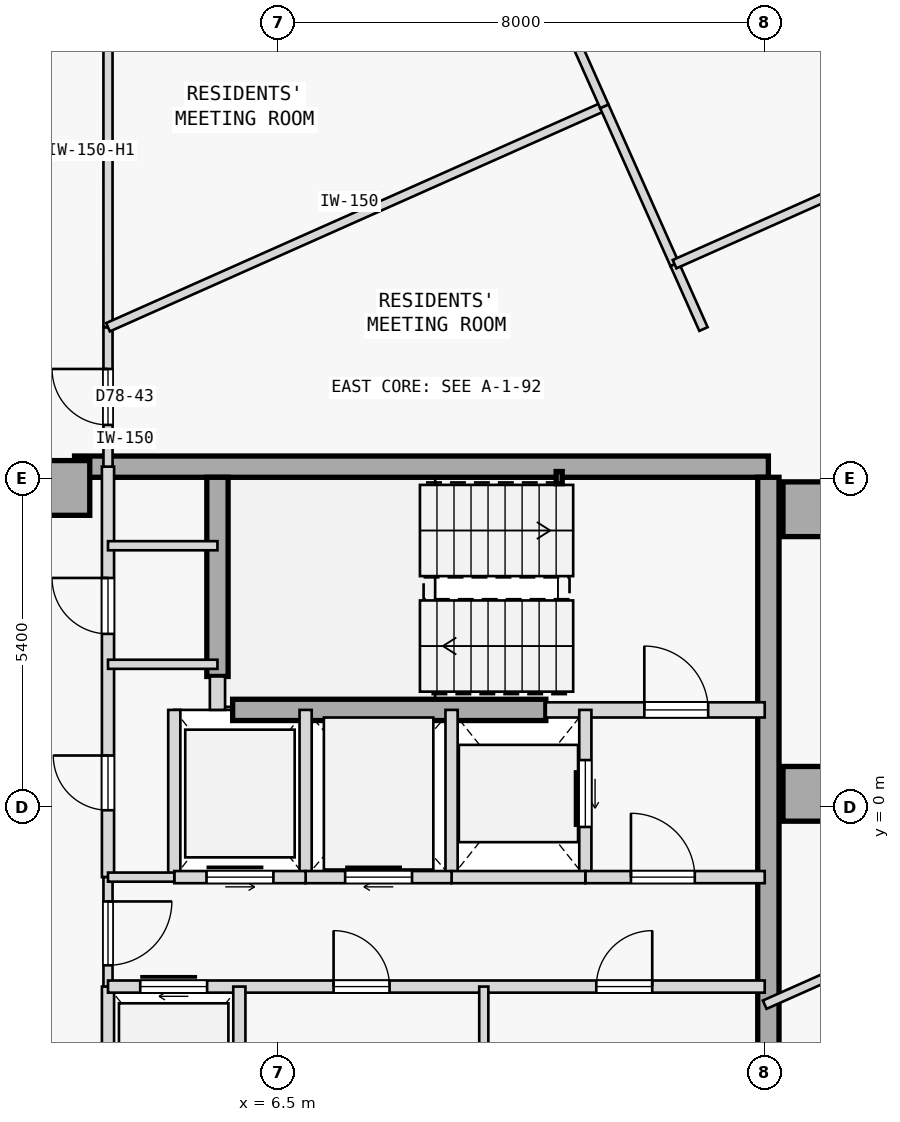
"""IFC4 building model, lengths in metres.
Left out: names, types, materials, properties, quantities, classifications, styles, units other than length and angle.
Written with IfcOpenShell. Run it as: python <this file> out.ifc"""

import sys

from ifc_helpers import new_model, si_unit, direction, frame, frame_2d, origin, origin_2d, place, context, subcontext, project, spatial, rectangle, hollow_rectangle, extrude, element, fill, save


model = new_model("IFC4")
c1 = context("Model", 3, precision=1e-05, world=origin(), true_north=direction((0.0, 1.0)))
c2 = subcontext(c1, "Body", "Model", "MODEL_VIEW")
j1 = project(units=[si_unit("LENGTHUNIT", "METRE"), si_unit("PLANEANGLEUNIT", "RADIAN")], contexts=[c1])
p1 = place(None, origin())
s1 = spatial("IfcSite", under=j1, at=p1, CompositionType="ELEMENT")
p2 = place(p1, origin())
s2 = spatial("IfcBuilding", under=s1, at=p2, CompositionType="ELEMENT")
p3 = place(p2, frame((0.0, 0.0, 291.95)))
s3 = spatial("IfcBuildingStorey", under=s2, at=p3, CompositionType="ELEMENT", Elevation=291.95)
for number, where, z_axis, x_axis in (
    (1, (15.25, 4.9, 0.0), (0.0, 0.0, 1.0), (1.0, 0.0, 0.0)),
    (2, (15.25, 0.22, 0.0), (0.0, 0.0, 1.0), (1.0, 0.0, 0.0)),
    (3, (2.95, 5.25, 0.0), (0.0, 0.0, 1.0), (1.0, 0.0, 0.0)),
):
    element("IfcColumn", number, at=place(p3, frame(where, z_axis=z_axis, x_axis=x_axis)), inside=s3, PredefinedType="COLUMN", context=c2, shape_type="SweptSolid", body=[
        extrude(rectangle(XDim=0.9, YDim=0.9, at=origin_2d()), origin(), (0.0, 0.0, 1.0), 3.35),
    ])
p4 = place(p3, frame((3.15, 5.6, 0.0), z_axis=(0.0, 0.0, 1.0), x_axis=(1.0, 0.0, 0.0)))
e4 = element("IfcWall", 4, at=p4, inside=s3, PredefinedType="SHEAR", context=c2, shape_type="SweptSolid", body=[
    extrude(rectangle(XDim=11.41, YDim=0.35, at=frame_2d((5.705, 0.0))), origin(), (0.0, 0.0, 1.0), 3.125),
])
p5 = place(p3, frame((14.56, -5.425, 0.0), z_axis=(0.0, 0.0, 1.0), x_axis=(0.0, 1.0, 0.0)))
e5 = element("IfcWall", 5, at=p5, inside=s3, PredefinedType="SHEAR", context=c2, shape_type="SweptSolid", body=[
    extrude(rectangle(XDim=10.85, YDim=0.35, at=frame_2d((5.425, 0.0))), origin(), (0.0, 0.0, 1.0), 3.125),
])
p6 = place(p3, frame((5.5, 2.15, 0.0), z_axis=(0.0, 0.0, 1.0), x_axis=(0.0, 1.0, 0.0)))
e6 = element("IfcWall", 6, at=p6, inside=s3, PredefinedType="SHEAR", context=c2, shape_type="SweptSolid", body=[
    extrude(rectangle(XDim=3.275, YDim=0.35, at=frame_2d((1.638, 0.0))), origin(), (0.0, 0.0, 1.0), 3.125),
])
p7 = place(p3, frame((5.75, 1.6, 0.0), z_axis=(0.0, 0.0, 1.0), x_axis=(1.0, 0.0, 0.0)))
e7 = element("IfcWall", 7, at=p7, inside=s3, PredefinedType="SHEAR", context=c2, shape_type="SweptSolid", body=[
    extrude(rectangle(XDim=5.15, YDim=0.35, at=frame_2d((2.575, 0.0))), origin(), (0.0, 0.0, 1.0), 3.125),
])
p8 = place(p3, frame((11.12, 5.42, 0.0), z_axis=(0.0, 0.0, 1.0), x_axis=(1.0, 0.0, 0.0)))
e8 = element("IfcColumn", 8, at=p8, inside=s3, PredefinedType="COLUMN", context=c2, shape_type="SweptSolid", body=[
    extrude(hollow_rectangle(XDim=0.1, YDim=0.2, WallThickness=0.008, at=origin_2d()), origin(), (0.0, 0.0, 1.0), 3.35),
])
p9 = place(p3, frame((10.9, 1.6, 0.0), z_axis=(0.0, 0.0, 1.0), x_axis=(1.0, 0.0, 0.0)))
e9 = element("IfcWall", 9, at=p9, inside=s3, PredefinedType="STANDARD", context=c2, shape_type="SweptSolid", body=[
    extrude(rectangle(XDim=3.6, YDim=0.25, at=frame_2d((1.8, 0.0))), origin(), (0.0, 0.0, 1.0), 3.125),
])
p10 = place(p9, frame((1.62, 0.0, 0.0)))
e10 = element("IfcOpeningElement", 10, at=p10, cuts=e9, PredefinedType="OPENING", context=c2, shape_type="SweptSolid", body=[
    extrude(rectangle(XDim=1.05, YDim=2.15, at=frame_2d((0.525, 1.075))), frame((0.0, 0.135, 0.0), z_axis=(0.0, -1.0, 0.0), x_axis=(1.0, 0.0, 0.0)), (0.0, 0.0, 1.0), 0.27),
])
p11 = place(p3, frame((5.5, 1.6, 0.0), z_axis=(0.0, 0.0, 1.0), x_axis=(0.0, 1.0, 0.0)))
e11 = element("IfcWall", 11, at=p11, inside=s3, PredefinedType="STANDARD", context=c2, shape_type="SweptSolid", body=[
    extrude(rectangle(XDim=0.55, YDim=0.25, at=frame_2d((0.275, 0.0))), origin(), (0.0, 0.0, 1.0), 3.125),
])
p12 = place(p3, frame((3.7, -1.15, 0.0), z_axis=(0.0, 0.0, 1.0), x_axis=(0.0, 1.0, 0.0)))
e12 = element("IfcWall", 12, at=p12, inside=s3, PredefinedType="STANDARD", context=c2, shape_type="SweptSolid", body=[
    extrude(rectangle(XDim=6.75, YDim=0.2, at=frame_2d((3.375, 0.0))), origin(), (0.0, 0.0, 1.0), 3.125),
])
p13 = place(p12, frame((1.1, 0.0, 0.0)))
e13 = element("IfcOpeningElement", 13, at=p13, cuts=e12, PredefinedType="OPENING", context=c2, shape_type="SweptSolid", body=[
    extrude(rectangle(XDim=0.9, YDim=2.15, at=frame_2d((0.45, 1.075))), frame((0.0, 0.11, 0.0), z_axis=(0.0, -1.0, 0.0), x_axis=(1.0, 0.0, 0.0)), (0.0, 0.0, 1.0), 0.22),
])
p14 = place(p12, frame((4.0, 0.0, 0.0)))
e14 = element("IfcOpeningElement", 14, at=p14, cuts=e12, PredefinedType="OPENING", context=c2, shape_type="SweptSolid", body=[
    extrude(rectangle(XDim=0.92, YDim=2.15, at=frame_2d((0.46, 1.075))), frame((0.0, 0.11, 0.0), z_axis=(0.0, -1.0, 0.0), x_axis=(1.0, 0.0, 0.0)), (0.0, 0.0, 1.0), 0.22),
])
p15 = place(p3, frame((3.7, -2.95, 0.0), z_axis=(0.0, 0.0, 1.0), x_axis=(0.0, 1.0, 0.0)))
e15 = element("IfcWall", 15, at=p15, inside=s3, PredefinedType="PARTITIONING", context=c2, shape_type="SweptSolid", body=[
    extrude(rectangle(XDim=1.8, YDim=0.15, at=frame_2d((0.9, 0.0))), origin(), (0.0, 0.0, 1.0), 3.125),
])
p16 = place(p15, frame((0.35, 0.0, 0.0)))
e16 = element("IfcOpeningElement", 16, at=p16, cuts=e15, PredefinedType="OPENING", context=c2, shape_type="SweptSolid", body=[
    extrude(rectangle(XDim=1.05, YDim=2.18, at=frame_2d((0.525, 1.09))), frame((0.0, 0.085, 0.0), z_axis=(0.0, -1.0, 0.0), x_axis=(1.0, 0.0, 0.0)), (0.0, 0.0, 1.0), 0.17),
])
p17 = place(p3, frame((3.7, -5.6, 0.0), z_axis=(0.0, 0.0, 1.0), x_axis=(0.0, 1.0, 0.0)))
e17 = element("IfcWall", 17, at=p17, inside=s3, PredefinedType="STANDARD", context=c2, shape_type="SweptSolid", body=[
    extrude(rectangle(XDim=2.65, YDim=0.2, at=frame_2d((1.325, 0.0))), origin(), (0.0, 0.0, 1.0), 3.125),
])
p18 = place(p3, frame((11.55, -1.15, 0.0), z_axis=(0.0, 0.0, 1.0), x_axis=(0.0, 1.0, 0.0)))
e18 = element("IfcWall", 18, at=p18, inside=s3, PredefinedType="STANDARD", context=c2, shape_type="SweptSolid", body=[
    extrude(rectangle(XDim=2.75, YDim=0.2, at=frame_2d((1.375, 0.0))), origin(), (0.0, 0.0, 1.0), 3.125),
])
p19 = place(p18, frame((0.825, 0.0, 0.0)))
e19 = element("IfcOpeningElement", 19, at=p19, cuts=e18, PredefinedType="OPENING", context=c2, shape_type="SweptSolid", body=[
    extrude(rectangle(XDim=1.1, YDim=2.15, at=frame_2d((0.55, 1.075))), frame((0.0, 0.11, 0.0), z_axis=(0.0, -1.0, 0.0), x_axis=(1.0, 0.0, 0.0)), (0.0, 0.0, 1.0), 0.22),
])
p20 = place(p3, frame((9.35, -1.15, 0.0), z_axis=(0.0, 0.0, 1.0), x_axis=(0.0, 1.0, 0.0)))
e20 = element("IfcWall", 20, at=p20, inside=s3, PredefinedType="STANDARD", context=c2, shape_type="SweptSolid", body=[
    extrude(rectangle(XDim=2.75, YDim=0.2, at=frame_2d((1.375, 0.0))), origin(), (0.0, 0.0, 1.0), 3.125),
])
p21 = place(p3, frame((11.55, -1.15, 0.0), z_axis=(0.0, 0.0, 1.0), x_axis=(1.0, 0.0, 0.0)))
e21 = element("IfcWall", 21, at=p21, inside=s3, PredefinedType="STANDARD", context=c2, shape_type="SweptSolid", body=[
    extrude(rectangle(XDim=2.95, YDim=0.2, at=frame_2d((1.475, 0.0))), origin(), (0.0, 0.0, 1.0), 3.125),
])
p22 = place(p21, frame((0.75, 0.0, 0.0)))
e22 = element("IfcOpeningElement", 22, at=p22, cuts=e21, PredefinedType="OPENING", context=c2, shape_type="SweptSolid", body=[
    extrude(rectangle(XDim=1.05, YDim=2.18, at=frame_2d((0.525, 1.09))), frame((0.0, 0.11, 0.0), z_axis=(0.0, -1.0, 0.0), x_axis=(1.0, 0.0, 0.0)), (0.0, 0.0, 1.0), 0.22),
])
p23 = place(p3, frame((9.35, -1.15, 0.0), z_axis=(0.0, 0.0, 1.0), x_axis=(1.0, 0.0, 0.0)))
e23 = element("IfcWall", 23, at=p23, inside=s3, PredefinedType="STANDARD", context=c2, shape_type="SweptSolid", body=[
    extrude(rectangle(XDim=2.2, YDim=0.2, at=frame_2d((1.1, 0.0))), origin(), (0.0, 0.0, 1.0), 3.125),
])
p24 = place(p3, frame((6.95, -1.15, 0.0), z_axis=(0.0, 0.0, 1.0), x_axis=(0.0, 1.0, 0.0)))
e24 = element("IfcWall", 24, at=p24, inside=s3, PredefinedType="STANDARD", context=c2, shape_type="SweptSolid", body=[
    extrude(rectangle(XDim=2.75, YDim=0.2, at=frame_2d((1.375, 0.0))), origin(), (0.0, 0.0, 1.0), 3.125),
])
p25 = place(p3, frame((6.95, -1.15, 0.0), z_axis=(0.0, 0.0, 1.0), x_axis=(1.0, 0.0, 0.0)))
e25 = element("IfcWall", 25, at=p25, inside=s3, PredefinedType="STANDARD", context=c2, shape_type="SweptSolid", body=[
    extrude(rectangle(XDim=2.4, YDim=0.2, at=frame_2d((1.2, 0.0))), origin(), (0.0, 0.0, 1.0), 3.125),
])
p26 = place(p25, frame((0.65, 0.0, 0.0)))
e26 = element("IfcOpeningElement", 26, at=p26, cuts=e25, PredefinedType="OPENING", context=c2, shape_type="SweptSolid", body=[
    extrude(rectangle(XDim=1.1, YDim=2.15, at=frame_2d((0.55, 1.075))), frame((0.0, 0.11, 0.0), z_axis=(0.0, -1.0, 0.0), x_axis=(1.0, 0.0, 0.0)), (0.0, 0.0, 1.0), 0.22),
])
p27 = place(p3, frame((4.79, -1.15, 0.0), z_axis=(0.0, 0.0, 1.0), x_axis=(0.0, 1.0, 0.0)))
e27 = element("IfcWall", 27, at=p27, inside=s3, PredefinedType="STANDARD", context=c2, shape_type="SweptSolid", body=[
    extrude(rectangle(XDim=2.75, YDim=0.2, at=frame_2d((1.375, 0.0))), origin(), (0.0, 0.0, 1.0), 3.125),
])
p28 = place(p3, frame((4.79, -1.15, 0.0), z_axis=(0.0, 0.0, 1.0), x_axis=(1.0, 0.0, 0.0)))
e28 = element("IfcWall", 28, at=p28, inside=s3, PredefinedType="STANDARD", context=c2, shape_type="SweptSolid", body=[
    extrude(rectangle(XDim=2.16, YDim=0.2, at=frame_2d((1.08, 0.0))), origin(), (0.0, 0.0, 1.0), 3.125),
])
p29 = place(p28, frame((0.53, 0.0, 0.0)))
e29 = element("IfcOpeningElement", 29, at=p29, cuts=e28, PredefinedType="OPENING", context=c2, shape_type="SweptSolid", body=[
    extrude(rectangle(XDim=1.1, YDim=2.15, at=frame_2d((0.55, 1.075))), frame((0.0, 0.11, 0.0), z_axis=(0.0, -1.0, 0.0), x_axis=(1.0, 0.0, 0.0)), (0.0, 0.0, 1.0), 0.22),
])
p30 = place(p3, frame((3.7, -1.15, 0.0), z_axis=(0.0, 0.0, 1.0), x_axis=(1.0, 0.0, 0.0)))
e30 = element("IfcWall", 30, at=p30, inside=s3, PredefinedType="PARTITIONING", context=c2, shape_type="SweptSolid", body=[
    extrude(rectangle(XDim=1.09, YDim=0.15, at=frame_2d((0.545, 0.0))), origin(), (0.0, 0.0, 1.0), 3.125),
])
p31 = place(p3, frame((3.7, -2.95, 0.0), z_axis=(0.0, 0.0, 1.0), x_axis=(1.0, 0.0, 0.0)))
e31 = element("IfcWall", 31, at=p31, inside=s3, PredefinedType="STANDARD", context=c2, shape_type="SweptSolid", body=[
    extrude(rectangle(XDim=10.8, YDim=0.2, at=frame_2d((5.4, 0.0))), origin(), (0.0, 0.0, 1.0), 3.125),
])
p32 = place(p31, frame((0.53, 0.0, 0.0)))
e32 = element("IfcOpeningElement", 32, at=p32, cuts=e31, PredefinedType="OPENING", context=c2, shape_type="SweptSolid", body=[
    extrude(rectangle(XDim=1.1, YDim=2.15, at=frame_2d((0.55, 1.075))), frame((0.0, 0.11, 0.0), z_axis=(0.0, -1.0, 0.0), x_axis=(1.0, 0.0, 0.0)), (0.0, 0.0, 1.0), 0.22),
])
p33 = place(p31, frame((3.71, 0.0, 0.0)))
e33 = element("IfcOpeningElement", 33, at=p33, cuts=e31, PredefinedType="OPENING", context=c2, shape_type="SweptSolid", body=[
    extrude(rectangle(XDim=0.92, YDim=2.15, at=frame_2d((0.46, 1.075))), frame((0.0, 0.11, 0.0), z_axis=(0.0, -1.0, 0.0), x_axis=(1.0, 0.0, 0.0)), (0.0, 0.0, 1.0), 0.22),
])
p34 = place(p31, frame((8.03, 0.0, 0.0)))
e34 = element("IfcOpeningElement", 34, at=p34, cuts=e31, PredefinedType="OPENING", context=c2, shape_type="SweptSolid", body=[
    extrude(rectangle(XDim=0.92, YDim=2.15, at=frame_2d((0.46, 1.075))), frame((0.0, 0.11, 0.0), z_axis=(0.0, -1.0, 0.0), x_axis=(1.0, 0.0, 0.0)), (0.0, 0.0, 1.0), 0.22),
])
p35 = place(p3, frame((5.86, -5.6, 0.0), z_axis=(0.0, 0.0, 1.0), x_axis=(0.0, 1.0, 0.0)))
e35 = element("IfcWall", 35, at=p35, inside=s3, PredefinedType="STANDARD", context=c2, shape_type="SweptSolid", body=[
    extrude(rectangle(XDim=2.65, YDim=0.2, at=frame_2d((1.325, 0.0))), origin(), (0.0, 0.0, 1.0), 3.125),
])
p36 = place(p3, frame((9.88, -5.6, 0.0), z_axis=(0.0, 0.0, 1.0), x_axis=(0.0, 1.0, 0.0)))
e36 = element("IfcWall", 36, at=p36, inside=s3, PredefinedType="PARTITIONING", context=c2, shape_type="SweptSolid", body=[
    extrude(rectangle(XDim=2.65, YDim=0.15, at=frame_2d((1.325, 0.0))), origin(), (0.0, 0.0, 1.0), 3.125),
])
for number, where, z_axis, x_axis in (
    (37, (3.7, 4.3, 0.0), (0.0, 0.0, 1.0), (1.0, 0.0, 0.0)),
    (38, (3.7, 2.35, 0.0), (0.0, 0.0, 1.0), (1.0, 0.0, 0.0)),
):
    element("IfcWall", number, at=place(p3, frame(where, z_axis=z_axis, x_axis=x_axis)), inside=s3, PredefinedType="PARTITIONING", context=c2, shape_type="SweptSolid", body=[
        extrude(rectangle(XDim=1.8, YDim=0.15, at=frame_2d((0.9, 0.0))), origin(), (0.0, 0.0, 1.0), 3.125),
    ])
p37 = place(p3, frame((14.5, -5.6, 0.0), z_axis=(0.0, 0.0, 1.0), x_axis=(0.913550607208, 0.406725076766, 0.0)))
e39 = element("IfcWall", 39, at=p37, inside=s3, PredefinedType="PARTITIONING", context=c2, shape_type="SweptSolid", body=[
    extrude(rectangle(XDim=4.556, YDim=0.15, at=frame_2d((2.278, 0.0))), origin(), (0.0, 0.0, 1.0), 3.125),
])
p38 = place(p37, frame((2.501, 0.0, 0.0)))
e40 = element("IfcOpeningElement", 40, at=p38, cuts=e39, PredefinedType="OPENING", context=c2, shape_type="SweptSolid", body=[
    extrude(rectangle(XDim=0.92, YDim=2.15, at=frame_2d((0.46, 1.075))), frame((0.0, 0.085, 0.0), z_axis=(0.0, -1.0, 0.0), x_axis=(1.0, 0.0, 0.0)), (0.0, 0.0, 1.0), 0.17),
])
p39 = place(p3, frame((3.7, 5.601, 0.0), z_axis=(0.0, 0.0, 1.0), x_axis=(-0.00010651896, 0.999999994327, 0.0)))
e41 = element("IfcWall", 41, at=p39, inside=s3, PredefinedType="PARTITIONING", context=c2, shape_type="SweptSolid", body=[
    extrude(rectangle(XDim=2.292, YDim=0.15, at=frame_2d((1.146, 0.0))), origin(), (0.0, 0.0, 1.0), 3.125),
])
p40 = place(p39, frame((0.686, 0.0, 0.0)))
e42 = element("IfcOpeningElement", 42, at=p40, cuts=e41, PredefinedType="OPENING", context=c2, shape_type="SweptSolid", body=[
    extrude(rectangle(XDim=0.92, YDim=2.15, at=frame_2d((0.46, 1.075))), frame((0.0, 0.085, 0.0), z_axis=(0.0, -1.0, 0.0), x_axis=(1.0, 0.0, 0.0)), (0.0, 0.0, 1.0), 0.17),
])
p41 = place(p3, frame((3.7, 7.893, 0.0), z_axis=(0.0, 0.0, 1.0), x_axis=(-4.2018572e-05, 0.999999999117, 0.0)))
e43 = element("IfcWall", 43, at=p41, inside=s3, PredefinedType="PARTITIONING", context=c2, shape_type="SweptSolid", body=[
    extrude(rectangle(XDim=5.81, YDim=0.15, at=frame_2d((2.905, 0.0))), origin(), (0.0, 0.0, 1.0), 2.675),
])
p42 = place(p3, frame((14.5, -3.248, 0.0), z_axis=(0.0, 0.0, 1.0), x_axis=(0.913542803573, 0.40674260416, 0.0)))
e44 = element("IfcWall", 44, at=p42, inside=s3, PredefinedType="PARTITIONING", context=c2, shape_type="SweptSolid", body=[
    extrude(rectangle(XDim=3.599, YDim=0.15, at=frame_2d((1.8, 0.0))), origin(), (0.0, 0.0, 1.0), 3.125),
])
p43 = place(p42, frame((1.34, 0.0, 0.0)))
e45 = element("IfcOpeningElement", 45, at=p43, cuts=e44, PredefinedType="OPENING", context=c2, shape_type="SweptSolid", body=[
    extrude(rectangle(XDim=0.92, YDim=2.15, at=frame_2d((0.46, 1.075))), frame((0.0, 0.085, 0.0), z_axis=(0.0, -1.0, 0.0), x_axis=(1.0, 0.0, 0.0)), (0.0, 0.0, 1.0), 0.17),
])
p44 = place(p3, frame((3.7, 7.893, 0.0), z_axis=(0.0, 0.0, 1.0), x_axis=(0.913545406364, 0.406736758251, 0.0)))
e46 = element("IfcWall", 46, at=p44, inside=s3, PredefinedType="PARTITIONING", context=c2, shape_type="SweptSolid", body=[
    extrude(rectangle(XDim=8.934, YDim=0.15, at=frame_2d((4.467, 0.0))), origin(), (0.0, 0.0, 1.0), 3.125),
])
p45 = place(p3, frame((13.493, 7.863, 0.0), z_axis=(0.0, 0.0, 1.0), x_axis=(-0.406720145117, 0.913552802829, 0.0)))
e47 = element("IfcWall", 47, at=p45, inside=s3, PredefinedType="PARTITIONING", context=c2, shape_type="SweptSolid", body=[
    extrude(rectangle(XDim=1.168, YDim=0.15, at=frame_2d((0.584, 0.0))), origin(), (0.0, 0.0, 1.0), 3.125),
])
p46 = place(p3, frame((13.018, 8.93, 0.0), z_axis=(0.0, 0.0, 1.0), x_axis=(-0.406768056625, 0.913531470782, 0.0)))
e48 = element("IfcWall", 48, at=p46, inside=s3, PredefinedType="PARTITIONING", context=c2, shape_type="SweptSolid", body=[
    extrude(rectangle(XDim=2.842, YDim=0.15, at=frame_2d((1.421, 0.0))), origin(), (0.0, 0.0, 1.0), 3.125),
])
p47 = place(p3, frame((11.862, 11.526, 0.0), z_axis=(0.0, 0.0, 1.0), x_axis=(-0.406760035505, 0.913535042303, 0.0)))
e49 = element("IfcWall", 49, at=p47, inside=s3, PredefinedType="PARTITIONING", context=c2, shape_type="SweptSolid", body=[
    extrude(rectangle(XDim=2.004, YDim=0.15, at=frame_2d((1.002, 0.0))), origin(), (0.0, 0.0, 1.0), 3.125),
])
p48 = place(p3, frame((13.018, 8.93, 0.0), z_axis=(0.0, 0.0, 1.0), x_axis=(0.913551014388, 0.406724162191, 0.0)))
e50 = element("IfcWall", 50, at=p48, inside=s3, PredefinedType="PARTITIONING", context=c2, shape_type="SweptSolid", body=[
    extrude(rectangle(XDim=14.192, YDim=0.15, at=frame_2d((7.096, 0.0))), origin(), (0.0, 0.0, 1.0), 3.125),
])
p49 = place(p48, frame((6.636, 0.0, 0.0)))
e51 = element("IfcOpeningElement", 51, at=p49, cuts=e50, PredefinedType="OPENING", context=c2, shape_type="SweptSolid", body=[
    extrude(rectangle(XDim=0.92, YDim=2.15, at=frame_2d((0.46, 1.075))), frame((0.0, 0.085, 0.0), z_axis=(0.0, -1.0, 0.0), x_axis=(1.0, 0.0, 0.0)), (0.0, 0.0, 1.0), 0.17),
])
p50 = place(p10, origin())
e52 = element("IfcDoor", 52, at=p50, inside=s3, OperationType="SINGLE_SWING_LEFT", PredefinedType="DOOR", context=c2, shape_type="SweptSolid", body=[
    extrude(rectangle(XDim=1.05, YDim=2.15, at=frame_2d((0.525, 1.075))), frame((0.0, 0.025, 0.0), z_axis=(0.0, -1.0, 0.0), x_axis=(1.0, 0.0, 0.0)), (0.0, 0.0, 1.0), 0.05),
])
fill(e10, e52)
p51 = place(p22, origin())
e53 = element("IfcDoor", 53, at=p51, inside=s3, OperationType="SINGLE_SWING_LEFT", PredefinedType="DOOR", context=c2, shape_type="SweptSolid", body=[
    extrude(rectangle(XDim=1.05, YDim=2.18, at=frame_2d((0.525, 1.09))), frame((0.0, 0.025, 0.0), z_axis=(0.0, -1.0, 0.0), x_axis=(1.0, 0.0, 0.0)), (0.0, 0.0, 1.0), 0.05),
])
fill(e22, e53)
p52 = place(p16, frame((1.05, 0.0, 0.0), z_axis=(0.0, 0.0, 1.0), x_axis=(-1.0, 0.0, 0.0)))
e54 = element("IfcDoor", 54, at=p52, inside=s3, OperationType="SINGLE_SWING_RIGHT", PredefinedType="DOOR", context=c2, shape_type="SweptSolid", body=[
    extrude(rectangle(XDim=1.05, YDim=2.18, at=frame_2d((0.525, 1.09))), frame((0.0, 0.025, 0.0), z_axis=(0.0, -1.0, 0.0), x_axis=(1.0, 0.0, 0.0)), (0.0, 0.0, 1.0), 0.05),
])
fill(e16, e54)
p53 = place(p19, origin())
e55 = element("IfcDoor", 55, at=p53, inside=s3, OperationType="SLIDING_TO_RIGHT", PredefinedType="DOOR", context=c2, shape_type="SweptSolid", body=[
    extrude(rectangle(XDim=1.1, YDim=2.15, at=frame_2d((0.55, 1.075))), frame((0.0, 0.025, 0.0), z_axis=(0.0, -1.0, 0.0), x_axis=(1.0, 0.0, 0.0)), (0.0, 0.0, 1.0), 0.05),
])
fill(e19, e55)
p54 = place(p26, origin())
e56 = element("IfcDoor", 56, at=p54, inside=s3, OperationType="SLIDING_TO_RIGHT", PredefinedType="DOOR", context=c2, shape_type="SweptSolid", body=[
    extrude(rectangle(XDim=1.1, YDim=2.15, at=frame_2d((0.55, 1.075))), frame((0.0, 0.025, 0.0), z_axis=(0.0, -1.0, 0.0), x_axis=(1.0, 0.0, 0.0)), (0.0, 0.0, 1.0), 0.05),
])
fill(e26, e56)
p55 = place(p29, origin())
e57 = element("IfcDoor", 57, at=p55, inside=s3, OperationType="SLIDING_TO_LEFT", PredefinedType="DOOR", context=c2, shape_type="SweptSolid", body=[
    extrude(rectangle(XDim=1.1, YDim=2.15, at=frame_2d((0.55, 1.075))), frame((0.0, 0.025, 0.0), z_axis=(0.0, -1.0, 0.0), x_axis=(1.0, 0.0, 0.0)), (0.0, 0.0, 1.0), 0.05),
])
fill(e29, e57)
p56 = place(p32, origin())
e58 = element("IfcDoor", 58, at=p56, inside=s3, OperationType="SLIDING_TO_RIGHT", PredefinedType="DOOR", context=c2, shape_type="SweptSolid", body=[
    extrude(rectangle(XDim=1.1, YDim=2.15, at=frame_2d((0.55, 1.075))), frame((0.0, 0.025, 0.0), z_axis=(0.0, -1.0, 0.0), x_axis=(1.0, 0.0, 0.0)), (0.0, 0.0, 1.0), 0.05),
])
fill(e32, e58)
p57 = place(p33, origin())
e59 = element("IfcDoor", 59, at=p57, inside=s3, OperationType="SINGLE_SWING_LEFT", PredefinedType="DOOR", context=c2, shape_type="SweptSolid", body=[
    extrude(rectangle(XDim=0.92, YDim=2.15, at=frame_2d((0.46, 1.075))), frame((0.0, 0.025, 0.0), z_axis=(0.0, -1.0, 0.0), x_axis=(1.0, 0.0, 0.0)), (0.0, 0.0, 1.0), 0.05),
])
fill(e33, e59)
p58 = place(p34, origin())
e60 = element("IfcDoor", 60, at=p58, inside=s3, OperationType="SINGLE_SWING_RIGHT", PredefinedType="DOOR", context=c2, shape_type="SweptSolid", body=[
    extrude(rectangle(XDim=0.92, YDim=2.15, at=frame_2d((0.46, 1.075))), frame((0.0, 0.025, 0.0), z_axis=(0.0, -1.0, 0.0), x_axis=(1.0, 0.0, 0.0)), (0.0, 0.0, 1.0), 0.05),
])
fill(e34, e60)
p59 = place(p13, origin())
e61 = element("IfcDoor", 61, at=p59, inside=s3, OperationType="SINGLE_SWING_RIGHT", PredefinedType="DOOR", context=c2, shape_type="SweptSolid", body=[
    extrude(rectangle(XDim=0.9, YDim=2.15, at=frame_2d((0.45, 1.075))), frame((0.0, 0.025, 0.0), z_axis=(0.0, -1.0, 0.0), x_axis=(1.0, 0.0, 0.0)), (0.0, 0.0, 1.0), 0.05),
])
fill(e13, e61)
p60 = place(p14, origin())
e62 = element("IfcDoor", 62, at=p60, inside=s3, OperationType="SINGLE_SWING_RIGHT", PredefinedType="DOOR", context=c2, shape_type="SweptSolid", body=[
    extrude(rectangle(XDim=0.92, YDim=2.15, at=frame_2d((0.46, 1.075))), frame((0.0, 0.025, 0.0), z_axis=(0.0, -1.0, 0.0), x_axis=(1.0, 0.0, 0.0)), (0.0, 0.0, 1.0), 0.05),
])
fill(e14, e62)
p61 = place(p40, origin())
e63 = element("IfcDoor", 63, at=p61, inside=s3, OperationType="SINGLE_SWING_RIGHT", PredefinedType="DOOR", context=c2, shape_type="SweptSolid", body=[
    extrude(rectangle(XDim=0.92, YDim=2.15, at=frame_2d((0.46, 1.075))), frame((0.0, 0.025, 0.0), z_axis=(0.0, -1.0, 0.0), x_axis=(1.0, 0.0, 0.0)), (0.0, 0.0, 1.0), 0.05),
])
fill(e42, e63)
save(model, sys.argv[1])
